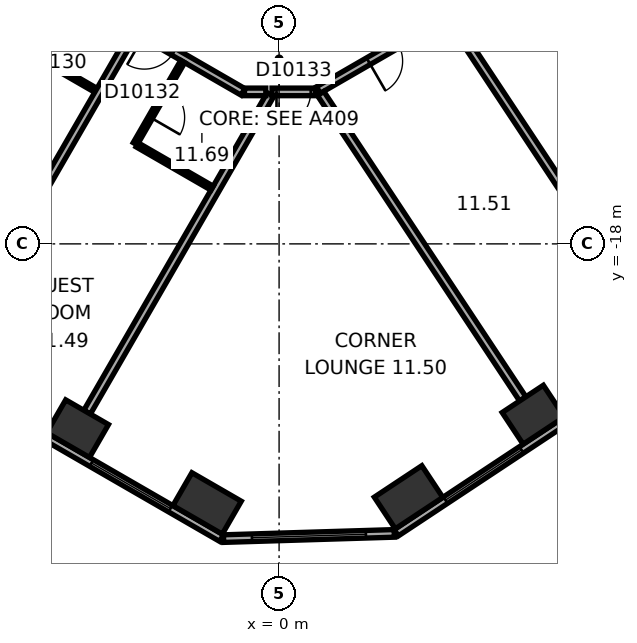
"""IFC4 building model, lengths in metres.
Left out: names, types, materials, properties, quantities, classifications, styles, units other than length and angle.
Written with IfcOpenShell. Run it as: python <this file> out.ifc"""

import sys

from ifc_helpers import new_model, si_unit, direction, frame, frame_2d, origin, origin_2d, place, context, subcontext, project, spatial, rectangle, extrude, element, fill, save


model = new_model("IFC4")
c1 = context("Model", 3, precision=1e-05, world=origin(), true_north=direction((0.0, 1.0)))
c2 = subcontext(c1, "Body", "Model", "MODEL_VIEW")
j1 = project(units=[si_unit("LENGTHUNIT", "METRE"), si_unit("PLANEANGLEUNIT", "RADIAN")], contexts=[c1])
p1 = place(None, origin())
s1 = spatial("IfcSite", under=j1, at=p1, CompositionType="ELEMENT")
p2 = place(p1, origin())
s2 = spatial("IfcBuilding", under=s1, at=p2, CompositionType="ELEMENT")
p3 = place(p2, frame((0.0, 0.0, 57.2)))
s3 = spatial("IfcBuildingStorey", under=s2, at=p3, CompositionType="ELEMENT", Elevation=57.2)
p4 = place(p3, frame((-5.302, -22.862, 0.0), z_axis=(0.0, 0.0, 1.0), x_axis=(0.866025403784, -0.5, 0.0)))
e1 = element("IfcColumn", 1, at=p4, inside=s3, PredefinedType="COLUMN", context=c2, shape_type="SweptSolid", body=[
    extrude(rectangle(XDim=1.3, YDim=1.0, at=origin_2d()), origin(), (0.0, 0.0, 1.0), 3.3),
])
for number, where, z_axis, x_axis in (
    (2, (-1.895, -24.829, 0.0), (0.0, 0.0, 1.0), (0.866, -0.5, 0.0)),
    (3, (3.407, -24.667, 0.0), (0.0, 0.0, 1.0), (0.834, 0.552, 0.0)),
):
    element("IfcColumn", number, at=place(p3, frame(where, z_axis=z_axis, x_axis=x_axis)), inside=s3, PredefinedType="COLUMN", context=c2, shape_type="SweptSolid", body=[
        extrude(rectangle(XDim=1.5, YDim=1.0, at=origin_2d()), origin(), (0.0, 0.0, 1.0), 3.3),
    ])
p5 = place(p3, frame((6.688, -22.496, 0.0), z_axis=(0.0, 0.0, 1.0), x_axis=(0.833885822067, 0.551936985312, 0.0)))
e4 = element("IfcColumn", 4, at=p5, inside=s3, PredefinedType="COLUMN", context=c2, shape_type="SweptSolid", body=[
    extrude(rectangle(XDim=1.3, YDim=1.0, at=origin_2d()), origin(), (0.0, 0.0, 1.0), 3.3),
])
p6 = place(p3, frame((-19.914, -15.119, 0.0), z_axis=(0.0, 0.0, 1.0), x_axis=(0.866025418898, -0.499999973822, 0.0)))
e5 = element("IfcWall", 5, at=p6, inside=s3, PredefinedType="STANDARD", context=c2, shape_type="SweptSolid", body=[
    extrude(rectangle(XDim=21.246, YDim=0.2, at=frame_2d((10.623, 0.0))), origin(), (0.0, 0.0, 1.0), 3.3),
])
p7 = place(p6, frame((1.555, 0.0, 0.8)))
e6 = element("IfcOpeningElement", 6, at=p7, cuts=e5, PredefinedType="OPENING", context=c2, shape_type="SweptSolid", body=[
    extrude(rectangle(XDim=2.4, YDim=1.7, at=frame_2d((1.2, 0.85))), frame((0.0, 0.11, 0.0), z_axis=(0.0, -1.0, 0.0), x_axis=(1.0, 0.0, 0.0)), (0.0, 0.0, 1.0), 0.22),
])
p8 = place(p6, frame((5.489, 0.0, 0.8)))
e7 = element("IfcOpeningElement", 7, at=p8, cuts=e5, PredefinedType="OPENING", context=c2, shape_type="SweptSolid", body=[
    extrude(rectangle(XDim=2.4, YDim=1.7, at=frame_2d((1.2, 0.85))), frame((0.0, 0.11, 0.0), z_axis=(0.0, -1.0, 0.0), x_axis=(1.0, 0.0, 0.0)), (0.0, 0.0, 1.0), 0.22),
])
p9 = place(p6, frame((9.424, 0.0, 0.8)))
e8 = element("IfcOpeningElement", 8, at=p9, cuts=e5, PredefinedType="OPENING", context=c2, shape_type="SweptSolid", body=[
    extrude(rectangle(XDim=2.4, YDim=1.7, at=frame_2d((1.2, 0.85))), frame((0.0, 0.11, 0.0), z_axis=(0.0, -1.0, 0.0), x_axis=(1.0, 0.0, 0.0)), (0.0, 0.0, 1.0), 0.22),
])
p10 = place(p6, frame((13.358, 0.0, 0.8)))
e9 = element("IfcOpeningElement", 9, at=p10, cuts=e5, PredefinedType="OPENING", context=c2, shape_type="SweptSolid", body=[
    extrude(rectangle(XDim=2.4, YDim=1.7, at=frame_2d((1.2, 0.85))), frame((0.0, 0.11, 0.0), z_axis=(0.0, -1.0, 0.0), x_axis=(1.0, 0.0, 0.0)), (0.0, 0.0, 1.0), 0.22),
])
p11 = place(p6, frame((17.293, 0.0, 0.8)))
e10 = element("IfcOpeningElement", 10, at=p11, cuts=e5, PredefinedType="OPENING", context=c2, shape_type="SweptSolid", body=[
    extrude(rectangle(XDim=2.4, YDim=1.7, at=frame_2d((1.2, 0.85))), frame((0.0, 0.11, 0.0), z_axis=(0.0, -1.0, 0.0), x_axis=(1.0, 0.0, 0.0)), (0.0, 0.0, 1.0), 0.22),
])
p12 = place(p3, frame((-1.461, -25.755, 0.0), z_axis=(0.0, 0.0, 1.0), x_axis=(0.999533823446, 0.030530898895, 0.0)))
e11 = element("IfcWall", 11, at=p12, inside=s3, PredefinedType="STANDARD", context=c2, shape_type="SweptSolid", body=[
    extrude(rectangle(XDim=4.494, YDim=0.2, at=frame_2d((2.247, 0.0))), origin(), (0.0, 0.0, 1.0), 3.3),
])
p13 = place(p12, frame((0.747, 0.0, 0.8)))
e12 = element("IfcOpeningElement", 12, at=p13, cuts=e11, PredefinedType="OPENING", context=c2, shape_type="SweptSolid", body=[
    extrude(rectangle(XDim=3.0, YDim=1.7, at=frame_2d((1.5, 0.85))), frame((0.0, 0.11, 0.0), z_axis=(0.0, -1.0, 0.0), x_axis=(1.0, 0.0, 0.0)), (0.0, 0.0, 1.0), 0.22),
])
p14 = place(p3, frame((3.083, -25.601, 0.0), z_axis=(0.0, 0.0, 1.0), x_axis=(0.833884295743, 0.551939291329, 0.0)))
e13 = element("IfcWall", 13, at=p14, inside=s3, PredefinedType="STANDARD", context=c2, shape_type="SweptSolid", body=[
    extrude(rectangle(XDim=21.246, YDim=0.2, at=frame_2d((10.623, 0.0))), origin(), (0.0, 0.0, 1.0), 3.3),
])
p15 = place(p14, frame((1.553, 0.0, 0.8)))
e14 = element("IfcOpeningElement", 14, at=p15, cuts=e13, PredefinedType="OPENING", context=c2, shape_type="SweptSolid", body=[
    extrude(rectangle(XDim=2.4, YDim=1.7, at=frame_2d((1.2, 0.85))), frame((0.0, 0.11, 0.0), z_axis=(0.0, -1.0, 0.0), x_axis=(1.0, 0.0, 0.0)), (0.0, 0.0, 1.0), 0.22),
])
p16 = place(p14, frame((5.488, 0.0, 0.8)))
e15 = element("IfcOpeningElement", 15, at=p16, cuts=e13, PredefinedType="OPENING", context=c2, shape_type="SweptSolid", body=[
    extrude(rectangle(XDim=2.4, YDim=1.7, at=frame_2d((1.2, 0.85))), frame((0.0, 0.11, 0.0), z_axis=(0.0, -1.0, 0.0), x_axis=(1.0, 0.0, 0.0)), (0.0, 0.0, 1.0), 0.22),
])
p17 = place(p14, frame((9.422, 0.0, 0.8)))
e16 = element("IfcOpeningElement", 16, at=p17, cuts=e13, PredefinedType="OPENING", context=c2, shape_type="SweptSolid", body=[
    extrude(rectangle(XDim=2.4, YDim=1.7, at=frame_2d((1.2, 0.85))), frame((0.0, 0.11, 0.0), z_axis=(0.0, -1.0, 0.0), x_axis=(1.0, 0.0, 0.0)), (0.0, 0.0, 1.0), 0.22),
])
p18 = place(p14, frame((13.357, 0.0, 0.8)))
e17 = element("IfcOpeningElement", 17, at=p18, cuts=e13, PredefinedType="OPENING", context=c2, shape_type="SweptSolid", body=[
    extrude(rectangle(XDim=2.4, YDim=1.7, at=frame_2d((1.2, 0.85))), frame((0.0, 0.11, 0.0), z_axis=(0.0, -1.0, 0.0), x_axis=(1.0, 0.0, 0.0)), (0.0, 0.0, 1.0), 0.22),
])
p19 = place(p14, frame((17.291, 0.0, 0.8)))
e18 = element("IfcOpeningElement", 18, at=p19, cuts=e13, PredefinedType="OPENING", context=c2, shape_type="SweptSolid", body=[
    extrude(rectangle(XDim=2.4, YDim=1.7, at=frame_2d((1.2, 0.85))), frame((0.0, 0.11, 0.0), z_axis=(0.0, -1.0, 0.0), x_axis=(1.0, 0.0, 0.0)), (0.0, 0.0, 1.0), 0.22),
])
p20 = place(p3, frame((-11.615, -7.843, 0.0), z_axis=(0.0, 0.0, 1.0), x_axis=(0.866026466995, -0.499998158461, 0.0)))
e19 = element("IfcWall", 19, at=p20, inside=s3, PredefinedType="PARTITIONING", context=c2, shape_type="SweptSolid", body=[
    extrude(rectangle(XDim=12.315, YDim=0.2, at=frame_2d((6.158, 0.0))), origin(), (0.0, 0.0, 1.0), 3.05),
])
p21 = place(p20, frame((4.608, 0.0, 0.0)))
e20 = element("IfcOpeningElement", 20, at=p21, cuts=e19, PredefinedType="OPENING", context=c2, shape_type="SweptSolid", body=[
    extrude(rectangle(XDim=1.0, YDim=2.1, at=frame_2d((0.5, 1.05))), frame((0.0, 0.11, 0.0), z_axis=(0.0, -1.0, 0.0), x_axis=(1.0, 0.0, 0.0)), (0.0, 0.0, 1.0), 0.22),
])
p22 = place(p20, frame((9.317, 0.0, 0.0)))
e21 = element("IfcOpeningElement", 21, at=p22, cuts=e19, PredefinedType="OPENING", context=c2, shape_type="SweptSolid", body=[
    extrude(rectangle(XDim=0.9, YDim=2.1, at=frame_2d((0.45, 1.05))), frame((0.0, 0.11, 0.0), z_axis=(0.0, -1.0, 0.0), x_axis=(1.0, 0.0, 0.0)), (0.0, 0.0, 1.0), 0.22),
])
p23 = place(p3, frame((-11.463, -10.125, 0.0), z_axis=(0.0, 0.0, 1.0), x_axis=(0.866014882148, -0.500018223566, 0.0)))
e22 = element("IfcWall", 22, at=p23, inside=s3, PredefinedType="PARTITIONING", context=c2, shape_type="SweptSolid", body=[
    extrude(rectangle(XDim=7.669, YDim=0.12, at=frame_2d((3.834, 0.0))), origin(), (0.0, 0.0, 1.0), 3.05),
])
p24 = place(p23, frame((0.55, 0.0, 0.0)))
e23 = element("IfcOpeningElement", 23, at=p24, cuts=e22, PredefinedType="OPENING", context=c2, shape_type="SweptSolid", body=[
    extrude(rectangle(XDim=1.0, YDim=2.1, at=frame_2d((0.5, 1.05))), frame((0.0, 0.07, 0.0), z_axis=(0.0, -1.0, 0.0), x_axis=(1.0, 0.0, 0.0)), (0.0, 0.0, 1.0), 0.14),
])
p25 = place(p23, frame((2.7, 0.0, 0.0)))
e24 = element("IfcOpeningElement", 24, at=p25, cuts=e22, PredefinedType="OPENING", context=c2, shape_type="SweptSolid", body=[
    extrude(rectangle(XDim=0.9, YDim=2.1, at=frame_2d((0.45, 1.05))), frame((0.0, 0.07, 0.0), z_axis=(0.0, -1.0, 0.0), x_axis=(1.0, 0.0, 0.0)), (0.0, 0.0, 1.0), 0.14),
])
p26 = place(p23, frame((5.485, 0.0, 0.0)))
e25 = element("IfcOpeningElement", 25, at=p26, cuts=e22, PredefinedType="OPENING", context=c2, shape_type="SweptSolid", body=[
    extrude(rectangle(XDim=0.9, YDim=2.1, at=frame_2d((0.45, 1.05))), frame((0.0, 0.07, 0.0), z_axis=(0.0, -1.0, 0.0), x_axis=(1.0, 0.0, 0.0)), (0.0, 0.0, 1.0), 0.14),
])
p27 = place(p3, frame((-8.46, -20.461, 0.0), z_axis=(0.0, 0.0, 1.0), x_axis=(0.499999662836, 0.866025598446, 0.0)))
e26 = element("IfcWall", 26, at=p27, inside=s3, PredefinedType="PARTITIONING", context=c2, shape_type="SweptSolid", body=[
    extrude(rectangle(XDim=9.25, YDim=0.2, at=frame_2d((4.625, 0.0))), origin(), (0.0, 0.0, 1.0), 3.05),
])
p28 = place(p3, frame((-5.052, -22.429, 0.0), z_axis=(0.0, 0.0, 1.0), x_axis=(0.50000569793, 0.866022114058, 0.0)))
e27 = element("IfcWall", 27, at=p28, inside=s3, PredefinedType="PARTITIONING", context=c2, shape_type="SweptSolid", body=[
    extrude(rectangle(XDim=9.65, YDim=0.2, at=frame_2d((4.825, 0.0))), origin(), (0.0, 0.0, 1.0), 3.05),
])
p29 = place(p3, frame((-3.786, -15.366, 0.0), z_axis=(0.0, 0.0, 1.0), x_axis=(0.500004234368, 0.866022959057, 0.0)))
e28 = element("IfcWall", 28, at=p29, inside=s3, PredefinedType="PARTITIONING", context=c2, shape_type="SweptSolid", body=[
    extrude(rectangle(XDim=2.5, YDim=0.12, at=frame_2d((1.25, 0.0))), origin(), (0.0, 0.0, 1.0), 3.05),
])
p30 = place(p29, frame((0.8, 0.0, 0.0)))
e29 = element("IfcOpeningElement", 29, at=p30, cuts=e28, PredefinedType="OPENING", context=c2, shape_type="SweptSolid", body=[
    extrude(rectangle(XDim=0.9, YDim=2.1, at=frame_2d((0.45, 1.05))), frame((0.0, 0.07, 0.0), z_axis=(0.0, -1.0, 0.0), x_axis=(1.0, 0.0, 0.0)), (0.0, 0.0, 1.0), 0.14),
])
p31 = place(p3, frame((-1.764, -16.533, 0.0), z_axis=(0.0, 0.0, 1.0), x_axis=(-0.866008641419, 0.500029032144, 0.0)))
e30 = element("IfcWall", 30, at=p31, inside=s3, PredefinedType="PARTITIONING", context=c2, shape_type="SweptSolid", body=[
    extrude(rectangle(XDim=2.275, YDim=0.12, at=frame_2d((1.137, 0.0))), origin(), (0.0, 0.0, 1.0), 3.05),
])
p32 = place(p3, frame((-0.91, -14.001, 0.0), z_axis=(0.0, 0.0, 1.0), x_axis=(1.0, 0.0, 0.0)))
e31 = element("IfcWall", 31, at=p32, inside=s3, PredefinedType="PARTITIONING", context=c2, shape_type="SweptSolid", body=[
    extrude(rectangle(XDim=0.56, YDim=0.2, at=frame_2d((0.28, 0.0))), origin(), (0.0, 0.0, 1.0), 3.05),
])
p33 = place(p3, frame((-0.186, -14.001, 0.0), z_axis=(0.0, 0.0, 1.0), x_axis=(1.0, 0.0, 0.0)))
e32 = element("IfcWall", 32, at=p33, inside=s3, PredefinedType="PARTITIONING", context=c2, shape_type="SweptSolid", body=[
    extrude(rectangle(XDim=1.136, YDim=0.2, at=frame_2d((0.568, 0.0))), origin(), (0.0, 0.0, 1.0), 3.05),
])
p34 = place(p33, frame((0.118, 0.0, 0.0)))
e33 = element("IfcOpeningElement", 33, at=p34, cuts=e32, PredefinedType="OPENING", context=c2, shape_type="SweptSolid", body=[
    extrude(rectangle(XDim=0.9, YDim=2.1, at=frame_2d((0.45, 1.05))), frame((0.0, 0.11, 0.0), z_axis=(0.0, -1.0, 0.0), x_axis=(1.0, 0.0, 0.0)), (0.0, 0.0, 1.0), 0.22),
])
p35 = place(p3, frame((1.033, -13.953, 0.0), z_axis=(0.0, 0.0, 1.0), x_axis=(0.866017531406, 0.500013635111, 0.0)))
e34 = element("IfcWall", 34, at=p35, inside=s3, PredefinedType="PARTITIONING", context=c2, shape_type="SweptSolid", body=[
    extrude(rectangle(XDim=6.58, YDim=0.2, at=frame_2d((3.29, 0.0))), origin(), (0.0, 0.0, 1.0), 3.05),
])
p36 = place(p35, frame((1.521, 0.0, 0.0)))
e35 = element("IfcOpeningElement", 35, at=p36, cuts=e34, PredefinedType="OPENING", context=c2, shape_type="SweptSolid", body=[
    extrude(rectangle(XDim=0.9, YDim=2.1, at=frame_2d((0.45, 1.05))), frame((0.0, 0.11, 0.0), z_axis=(0.0, -1.0, 0.0), x_axis=(1.0, 0.0, 0.0)), (0.0, 0.0, 1.0), 0.22),
])
p37 = place(p35, frame((4.811, 0.0, 0.0)))
e36 = element("IfcOpeningElement", 36, at=p37, cuts=e34, PredefinedType="OPENING", context=c2, shape_type="SweptSolid", body=[
    extrude(rectangle(XDim=0.9, YDim=2.1, at=frame_2d((0.45, 1.05))), frame((0.0, 0.11, 0.0), z_axis=(0.0, -1.0, 0.0), x_axis=(1.0, 0.0, 0.0)), (0.0, 0.0, 1.0), 0.22),
])
p38 = place(p3, frame((6.412, -22.079, 0.0), z_axis=(0.0, 0.0, 1.0), x_axis=(-0.551919507115, 0.83389739037, 0.0)))
e37 = element("IfcWall", 37, at=p38, inside=s3, PredefinedType="PARTITIONING", context=c2, shape_type="SweptSolid", body=[
    extrude(rectangle(XDim=9.635, YDim=0.2, at=frame_2d((4.817, 0.0))), origin(), (0.0, 0.0, 1.0), 3.05),
])
p39 = place(p3, frame((8.733, -14.127, 0.0), z_axis=(0.0, 0.0, 1.0), x_axis=(-0.499978132246, 0.86603802877, 0.0)))
e38 = element("IfcWall", 38, at=p39, inside=s3, PredefinedType="PARTITIONING", context=c2, shape_type="SweptSolid", body=[
    extrude(rectangle(XDim=2.921, YDim=0.12, at=frame_2d((1.46, 0.0))), origin(), (0.0, 0.0, 1.0), 3.05),
])
p40 = place(p39, frame((1.01, 0.0, 0.0)))
e39 = element("IfcOpeningElement", 39, at=p40, cuts=e38, PredefinedType="OPENING", context=c2, shape_type="SweptSolid", body=[
    extrude(rectangle(XDim=0.9, YDim=2.1, at=frame_2d((0.45, 1.05))), frame((0.0, 0.07, 0.0), z_axis=(0.0, -1.0, 0.0), x_axis=(1.0, 0.0, 0.0)), (0.0, 0.0, 1.0), 0.14),
])
p41 = place(p3, frame((9.693, -19.907, 0.0), z_axis=(0.0, 0.0, 1.0), x_axis=(-0.551938394837, 0.833884889121, 0.0)))
e40 = element("IfcWall", 40, at=p41, inside=s3, PredefinedType="PARTITIONING", context=c2, shape_type="SweptSolid", body=[
    extrude(rectangle(XDim=9.394, YDim=0.2, at=frame_2d((4.697, 0.0))), origin(), (0.0, 0.0, 1.0), 2.6),
])
p42 = place(p11, origin())
e41 = element("IfcWindow", 41, at=p42, inside=s3, PartitioningType="SINGLE_PANEL", PredefinedType="WINDOW", context=c2, shape_type="SweptSolid", body=[
    extrude(rectangle(XDim=2.4, YDim=1.7, at=frame_2d((1.2, 0.85))), frame((0.0, 0.03, 0.0), z_axis=(0.0, -1.0, 0.0), x_axis=(1.0, 0.0, 0.0)), (0.0, 0.0, 1.0), 0.06),
])
fill(e10, e41)
p43 = place(p13, origin())
e42 = element("IfcWindow", 42, at=p43, inside=s3, PartitioningType="SINGLE_PANEL", PredefinedType="WINDOW", context=c2, shape_type="SweptSolid", body=[
    extrude(rectangle(XDim=3.0, YDim=1.7, at=frame_2d((1.5, 0.85))), frame((0.0, 0.03, 0.0), z_axis=(0.0, -1.0, 0.0), x_axis=(1.0, 0.0, 0.0)), (0.0, 0.0, 1.0), 0.06),
])
fill(e12, e42)
p44 = place(p15, origin())
e43 = element("IfcWindow", 43, at=p44, inside=s3, PartitioningType="SINGLE_PANEL", PredefinedType="WINDOW", context=c2, shape_type="SweptSolid", body=[
    extrude(rectangle(XDim=2.4, YDim=1.7, at=frame_2d((1.2, 0.85))), frame((0.0, 0.03, 0.0), z_axis=(0.0, -1.0, 0.0), x_axis=(1.0, 0.0, 0.0)), (0.0, 0.0, 1.0), 0.06),
])
fill(e14, e43)
p45 = place(p26, origin())
e44 = element("IfcDoor", 44, at=p45, inside=s3, OperationType="SINGLE_SWING_LEFT", PredefinedType="DOOR", context=c2, shape_type="SweptSolid", body=[
    extrude(rectangle(XDim=0.9, YDim=2.1, at=frame_2d((0.45, 1.05))), frame((0.0, 0.025, 0.0), z_axis=(0.0, -1.0, 0.0), x_axis=(1.0, 0.0, 0.0)), (0.0, 0.0, 1.0), 0.05),
])
fill(e25, e44)
p46 = place(p22, origin())
e45 = element("IfcDoor", 45, at=p46, inside=s3, OperationType="SINGLE_SWING_LEFT", PredefinedType="DOOR", context=c2, shape_type="SweptSolid", body=[
    extrude(rectangle(XDim=0.9, YDim=2.1, at=frame_2d((0.45, 1.05))), frame((0.0, 0.025, 0.0), z_axis=(0.0, -1.0, 0.0), x_axis=(1.0, 0.0, 0.0)), (0.0, 0.0, 1.0), 0.05),
])
fill(e21, e45)
p47 = place(p30, origin())
e46 = element("IfcDoor", 46, at=p47, inside=s3, OperationType="SINGLE_SWING_LEFT", PredefinedType="DOOR", context=c2, shape_type="SweptSolid", body=[
    extrude(rectangle(XDim=0.9, YDim=2.1, at=frame_2d((0.45, 1.05))), frame((0.0, 0.025, 0.0), z_axis=(0.0, -1.0, 0.0), x_axis=(1.0, 0.0, 0.0)), (0.0, 0.0, 1.0), 0.05),
])
fill(e29, e46)
p48 = place(p34, origin())
e47 = element("IfcDoor", 47, at=p48, inside=s3, OperationType="SINGLE_SWING_LEFT", PredefinedType="DOOR", context=c2, shape_type="SweptSolid", body=[
    extrude(rectangle(XDim=0.9, YDim=2.1, at=frame_2d((0.45, 1.05))), frame((0.0, 0.025, 0.0), z_axis=(0.0, -1.0, 0.0), x_axis=(1.0, 0.0, 0.0)), (0.0, 0.0, 1.0), 0.05),
])
fill(e33, e47)
p49 = place(p36, origin())
e48 = element("IfcDoor", 48, at=p49, inside=s3, OperationType="SINGLE_SWING_LEFT", PredefinedType="DOOR", context=c2, shape_type="SweptSolid", body=[
    extrude(rectangle(XDim=0.9, YDim=2.1, at=frame_2d((0.45, 1.05))), frame((0.0, 0.025, 0.0), z_axis=(0.0, -1.0, 0.0), x_axis=(1.0, 0.0, 0.0)), (0.0, 0.0, 1.0), 0.05),
])
fill(e35, e48)
save(model, sys.argv[1])
